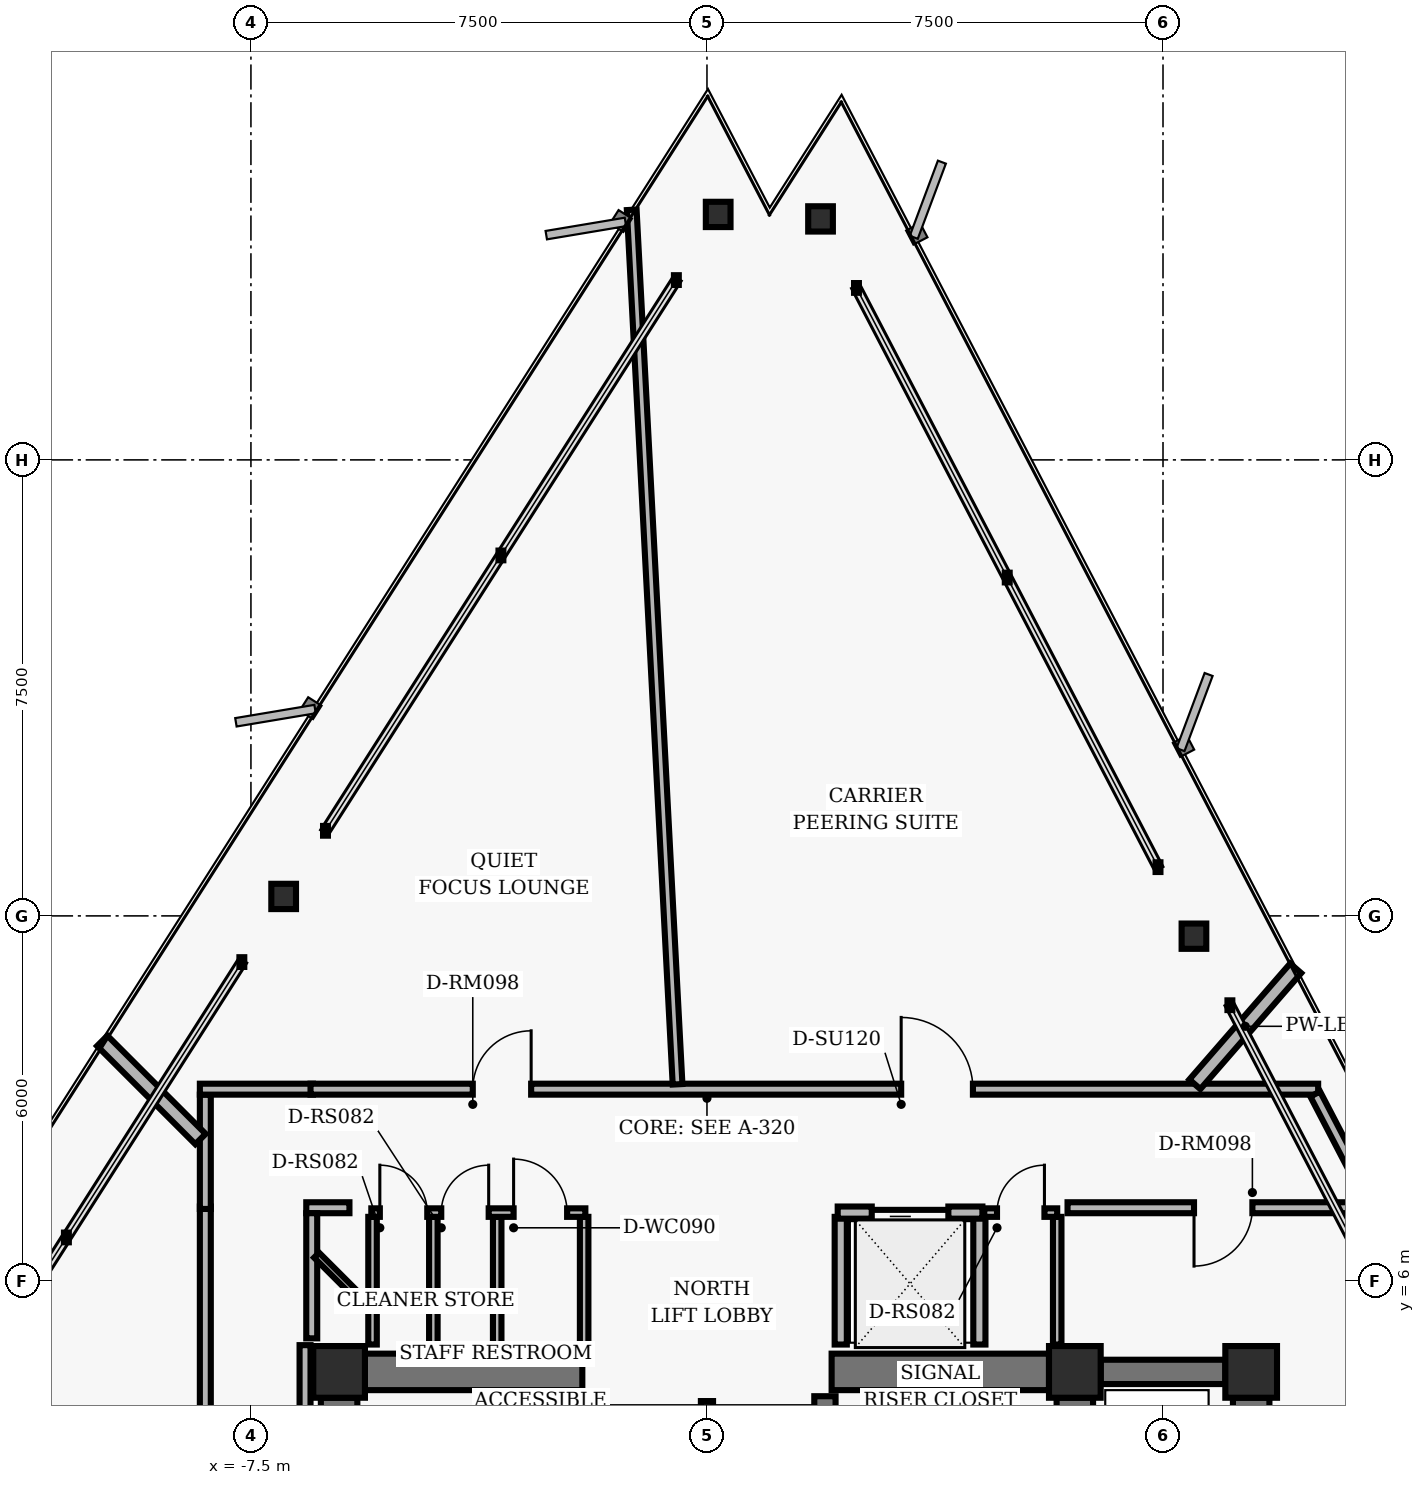
"""IFC4 building model, lengths in metres.
Left out: names, types, materials, properties, quantities, classifications, styles, units other than length and angle.
Written with IfcOpenShell. Run it as: python <this file> out.ifc"""

import sys

from ifc_helpers import new_model, si_unit, direction, frame, frame_2d, origin, origin_2d, place, context, subcontext, project, spatial, rectangle, hollow_rectangle, i_section, extrude, element, fill, save


model = new_model("IFC4")
c1 = context("Model", 3, precision=1e-05, world=origin(), true_north=direction((0.0, 1.0)))
c2 = subcontext(c1, "Body", "Model", "MODEL_VIEW")
j1 = project(units=[si_unit("LENGTHUNIT", "METRE"), si_unit("PLANEANGLEUNIT", "RADIAN")], contexts=[c1])
p1 = place(None, origin())
s1 = spatial("IfcSite", under=j1, at=p1, CompositionType="ELEMENT")
p2 = place(p1, origin())
s2 = spatial("IfcBuilding", under=s1, at=p2, CompositionType="ELEMENT")
p3 = place(p2, frame((0.0, 0.0, 125.92)))
s3 = spatial("IfcBuildingStorey", under=s2, at=p3, CompositionType="ELEMENT", Elevation=125.92)
for number, where, z_axis, x_axis in (
    (1, (-6.05, 4.5, 0.0), (0.0, 0.0, 1.0), (1.0, 0.0, 0.0)),
    (2, (6.05, 4.5, 0.0), (0.0, 0.0, 1.0), (1.0, 0.0, 0.0)),
    (3, (8.95, 4.5, 0.0), (0.0, 0.0, 1.0), (1.0, 0.0, 0.0)),
):
    element("IfcColumn", number, at=place(p3, frame(where, z_axis=z_axis, x_axis=x_axis)), inside=s3, PredefinedType="COLUMN", context=c2, shape_type="SweptSolid", body=[
        extrude(hollow_rectangle(XDim=0.85, YDim=0.85, WallThickness=0.055, InnerFilletRadius=0.02, OuterFilletRadius=0.04, at=origin_2d()), origin(), (0.0, 0.0, 1.0), 3.04),
    ])
for number, where, z_axis, x_axis in (
    (4, (-6.05, 0.425, 0.0), (0.0, 0.0, 1.0), (0.0, 1.0, 0.0)),
    (5, (6.05, 0.425, 0.0), (0.0, 0.0, 1.0), (0.0, 1.0, 0.0)),
):
    element("IfcWall", number, at=place(p3, frame(where, z_axis=z_axis, x_axis=x_axis)), inside=s3, PredefinedType="SHEAR", context=c2, shape_type="SweptSolid", body=[
        extrude(rectangle(XDim=3.65, YDim=0.6, at=frame_2d((1.825, 0.0))), origin(), (0.0, 0.0, 1.0), 2.788),
    ])
for number, where, z_axis, x_axis in (
    (6, (-1.94, -4.1, 0.0), (0.0, 0.0, 1.0), (0.0, 1.0, 0.0)),
    (7, (1.94, -4.1, 0.0), (0.0, 0.0, 1.0), (0.0, 1.0, 0.0)),
):
    element("IfcWall", number, at=place(p3, frame(where, z_axis=z_axis, x_axis=x_axis)), inside=s3, PredefinedType="SHEAR", context=c2, shape_type="SweptSolid", body=[
        extrude(rectangle(XDim=8.2, YDim=0.35, at=frame_2d((4.1, 0.0))), origin(), (0.0, 0.0, 1.0), 2.788),
    ])
for number, where, z_axis, x_axis in (
    (8, (-5.625, 4.5, 0.0), (0.0, 0.0, 1.0), (1.0, 0.0, 0.0)),
    (9, (2.05, 4.5, 0.0), (0.0, 0.0, 1.0), (1.0, 0.0, 0.0)),
):
    element("IfcWall", number, at=place(p3, frame(where, z_axis=z_axis, x_axis=x_axis)), inside=s3, PredefinedType="SHEAR", context=c2, shape_type="SweptSolid", body=[
        extrude(rectangle(XDim=3.575, YDim=0.6, at=frame_2d((1.788, 0.0))), origin(), (0.0, 0.0, 1.0), 2.788),
    ])
p4 = place(p3, frame((8.95, -3.875, 0.0), z_axis=(0.0, 0.0, 1.0), x_axis=(0.0, 1.0, 0.0)))
e10 = element("IfcWall", 10, at=p4, inside=s3, PredefinedType="SHEAR", context=c2, shape_type="SweptSolid", body=[
    extrude(rectangle(XDim=7.95, YDim=0.6, at=frame_2d((3.975, 0.0))), origin(), (0.0, 0.0, 1.0), 2.788),
])
p5 = place(p4, frame((0.55, 0.0, 0.0)))
e11 = element("IfcOpeningElement", 11, at=p5, cuts=e10, PredefinedType="OPENING", context=c2, shape_type="SweptSolid", body=[
    extrude(rectangle(XDim=1.06, YDim=2.04, at=frame_2d((0.53, 1.02))), frame((0.0, 0.31, 0.0), z_axis=(0.0, -1.0, 0.0), x_axis=(1.0, 0.0, 0.0)), (0.0, 0.0, 1.0), 0.62),
])
p6 = place(p4, frame((3.445, 0.0, 0.0)))
e12 = element("IfcOpeningElement", 12, at=p6, cuts=e10, PredefinedType="OPENING", context=c2, shape_type="SweptSolid", body=[
    extrude(rectangle(XDim=1.06, YDim=2.04, at=frame_2d((0.53, 1.02))), frame((0.0, 0.31, 0.0), z_axis=(0.0, -1.0, 0.0), x_axis=(1.0, 0.0, 0.0)), (0.0, 0.0, 1.0), 0.62),
])
p7 = place(p4, frame((6.33, 0.0, 0.0)))
e13 = element("IfcOpeningElement", 13, at=p7, cuts=e10, PredefinedType="OPENING", context=c2, shape_type="SweptSolid", body=[
    extrude(rectangle(XDim=1.06, YDim=2.04, at=frame_2d((0.53, 1.02))), frame((0.0, 0.31, 0.0), z_axis=(0.0, -1.0, 0.0), x_axis=(1.0, 0.0, 0.0)), (0.0, 0.0, 1.0), 0.62),
])
p8 = place(p3, frame((6.475, 4.5, 0.0), z_axis=(0.0, 0.0, 1.0), x_axis=(1.0, 0.0, 0.0)))
e14 = element("IfcWall", 14, at=p8, inside=s3, PredefinedType="SHEAR", context=c2, shape_type="SweptSolid", body=[
    extrude(rectangle(XDim=2.05, YDim=0.4, at=frame_2d((1.025, 0.0))), origin(), (0.0, 0.0, 1.0), 2.788),
])
for number, where, z_axis, x_axis in (
    (15, (8.009, 11.666, 0.0), (0.0, 0.0, 1.0), (1.0, 0.0, 0.0)),
    (16, (1.868, 23.463, 0.0), (0.0, 0.0, 1.0), (1.0, 0.0, 0.0)),
    (17, (0.184, 23.537, 0.0), (0.0, 0.0, 1.0), (1.0, 0.0, 0.0)),
    (18, (-6.962, 12.32, 0.0), (0.0, 0.0, 1.0), (1.0, 0.0, 0.0)),
):
    element("IfcColumn", number, at=place(p3, frame(where, z_axis=z_axis, x_axis=x_axis)), inside=s3, PredefinedType="COLUMN", context=c2, shape_type="SweptSolid", body=[
        extrude(i_section(OverallWidth=0.406, OverallDepth=0.416, WebThickness=0.03, FlangeThickness=0.048, FilletRadius=0.02, at=origin_2d()), origin(), (0.0, 0.0, 1.0), 3.04),
    ])
p9 = place(p3, frame((0.0, 1.25, 0.0), z_axis=(0.0, 0.0, 1.0), x_axis=(0.0, 1.0, 0.0)))
e19 = element("IfcWall", 19, at=p9, inside=s3, PredefinedType="PARTITIONING", context=c2, shape_type="SweptSolid", body=[
    extrude(rectangle(XDim=2.77, YDim=0.2, at=frame_2d((1.385, 0.0))), origin(), (0.0, 0.0, 1.0), 2.763),
])
for number, where, z_axis, x_axis in (
    (20, (2.2, 4.95, 0.0), (0.0, 0.0, 1.0), (0.0, 1.0, 0.0)),
    (21, (4.48, 4.95, 0.0), (0.0, 0.0, 1.0), (0.0, 1.0, 0.0)),
):
    element("IfcWall", number, at=place(p3, frame(where, z_axis=z_axis, x_axis=x_axis)), inside=s3, PredefinedType="PARTITIONING", context=c2, shape_type="SweptSolid", body=[
        extrude(rectangle(XDim=2.1, YDim=0.2, at=frame_2d((1.05, 0.0))), origin(), (0.0, 0.0, 1.0), 2.763),
    ])
p10 = place(p3, frame((2.15, 7.12, 0.0), z_axis=(0.0, 0.0, 1.0), x_axis=(1.0, 0.0, 0.0)))
e22 = element("IfcWall", 22, at=p10, inside=s3, PredefinedType="PARTITIONING", context=c2, shape_type="SweptSolid", body=[
    extrude(rectangle(XDim=2.38, YDim=0.2, at=frame_2d((1.19, 0.0))), origin(), (0.0, 0.0, 1.0), 2.763),
])
p11 = place(p10, frame((0.56, 0.0, 0.0)))
e23 = element("IfcOpeningElement", 23, at=p11, cuts=e22, PredefinedType="OPENING", context=c2, shape_type="SweptSolid", body=[
    extrude(rectangle(XDim=1.26, YDim=2.06, at=frame_2d((0.63, 1.03))), frame((0.0, 0.11, 0.0), z_axis=(0.0, -1.0, 0.0), x_axis=(1.0, 0.0, 0.0)), (0.0, 0.0, 1.0), 0.22),
])
for number, where, z_axis, x_axis in (
    (24, (-5.5, 4.95, 0.0), (0.0, 0.0, 1.0), (0.0, 1.0, 0.0)),
    (25, (-4.5, 4.95, 0.0), (0.0, 0.0, 1.0), (0.0, 1.0, 0.0)),
    (26, (-3.45, 4.95, 0.0), (0.0, 0.0, 1.0), (0.0, 1.0, 0.0)),
    (27, (-2.02, 4.95, 0.0), (0.0, 0.0, 1.0), (0.0, 1.0, 0.0)),
):
    element("IfcWall", number, at=place(p3, frame(where, z_axis=z_axis, x_axis=x_axis)), inside=s3, PredefinedType="PARTITIONING", context=c2, shape_type="SweptSolid", body=[
        extrude(rectangle(XDim=2.1, YDim=0.14, at=frame_2d((1.05, 0.0))), origin(), (0.0, 0.0, 1.0), 2.763),
    ])
p12 = place(p3, frame((-5.52, 7.12, 0.0), z_axis=(0.0, 0.0, 1.0), x_axis=(1.0, 0.0, 0.0)))
e28 = element("IfcWall", 28, at=p12, inside=s3, PredefinedType="PARTITIONING", context=c2, shape_type="SweptSolid", body=[
    extrude(rectangle(XDim=3.52, YDim=0.14, at=frame_2d((1.76, 0.0))), origin(), (0.0, 0.0, 1.0), 2.33),
])
p13 = place(p12, frame((0.14, 0.0, 0.0)))
e29 = element("IfcOpeningElement", 29, at=p13, cuts=e28, PredefinedType="OPENING", context=c2, shape_type="SweptSolid", body=[
    extrude(rectangle(XDim=0.78, YDim=2.01, at=frame_2d((0.39, 1.005))), frame((0.0, 0.08, 0.0), z_axis=(0.0, -1.0, 0.0), x_axis=(1.0, 0.0, 0.0)), (0.0, 0.0, 1.0), 0.16),
])
p14 = place(p12, frame((1.15, 0.0, 0.0)))
e30 = element("IfcOpeningElement", 30, at=p14, cuts=e28, PredefinedType="OPENING", context=c2, shape_type="SweptSolid", body=[
    extrude(rectangle(XDim=0.78, YDim=2.01, at=frame_2d((0.39, 1.005))), frame((0.0, 0.08, 0.0), z_axis=(0.0, -1.0, 0.0), x_axis=(1.0, 0.0, 0.0)), (0.0, 0.0, 1.0), 0.16),
])
p15 = place(p12, frame((2.34, 0.0, 0.0)))
e31 = element("IfcOpeningElement", 31, at=p15, cuts=e28, PredefinedType="OPENING", context=c2, shape_type="SweptSolid", body=[
    extrude(rectangle(XDim=0.88, YDim=2.02, at=frame_2d((0.44, 1.01))), frame((0.0, 0.08, 0.0), z_axis=(0.0, -1.0, 0.0), x_axis=(1.0, 0.0, 0.0)), (0.0, 0.0, 1.0), 0.16),
])
p16 = place(p3, frame((5.76, 4.95, 0.0), z_axis=(0.0, 0.0, 1.0), x_axis=(0.0, 1.0, 0.0)))
e32 = element("IfcWall", 32, at=p16, inside=s3, PredefinedType="PARTITIONING", context=c2, shape_type="SweptSolid", body=[
    extrude(rectangle(XDim=2.1, YDim=0.14, at=frame_2d((1.05, 0.0))), origin(), (0.0, 0.0, 1.0), 2.763),
])
p17 = place(p3, frame((4.56, 7.12, 0.0), z_axis=(0.0, 0.0, 1.0), x_axis=(1.0, 0.0, 0.0)))
e33 = element("IfcWall", 33, at=p17, inside=s3, PredefinedType="PARTITIONING", context=c2, shape_type="SweptSolid", body=[
    extrude(rectangle(XDim=1.2, YDim=0.14, at=frame_2d((0.6, 0.0))), origin(), (0.0, 0.0, 1.0), 2.763),
])
p18 = place(p17, frame((0.21, 0.0, 0.0)))
e34 = element("IfcOpeningElement", 34, at=p18, cuts=e33, PredefinedType="OPENING", context=c2, shape_type="SweptSolid", body=[
    extrude(rectangle(XDim=0.78, YDim=2.01, at=frame_2d((0.39, 1.005))), frame((0.0, 0.08, 0.0), z_axis=(0.0, -1.0, 0.0), x_axis=(1.0, 0.0, 0.0)), (0.0, 0.0, 1.0), 0.16),
])
p19 = place(p3, frame((-8.25, -7.22, 0.0), z_axis=(0.0, 0.0, 1.0), x_axis=(0.0, 1.0, 0.0)))
e35 = element("IfcWall", 35, at=p19, inside=s3, PredefinedType="PARTITIONING", context=c2, shape_type="SweptSolid", body=[
    extrude(rectangle(XDim=14.44, YDim=0.18, at=frame_2d((7.22, 0.0))), origin(), (0.0, 0.0, 1.0), 2.763),
])
p20 = place(p19, frame((2.932, 0.0, 0.0)))
e36 = element("IfcOpeningElement", 36, at=p20, cuts=e35, PredefinedType="OPENING", context=c2, shape_type="SweptSolid", body=[
    extrude(rectangle(XDim=1.18, YDim=2.02, at=frame_2d((0.59, 1.01))), frame((0.0, 0.1, 0.0), z_axis=(0.0, -1.0, 0.0), x_axis=(1.0, 0.0, 0.0)), (0.0, 0.0, 1.0), 0.2),
])
p21 = place(p19, frame((9.892, 0.0, 0.0)))
e37 = element("IfcOpeningElement", 37, at=p21, cuts=e35, PredefinedType="OPENING", context=c2, shape_type="SweptSolid", body=[
    extrude(rectangle(XDim=1.18, YDim=2.02, at=frame_2d((0.59, 1.01))), frame((0.0, 0.1, 0.0), z_axis=(0.0, -1.0, 0.0), x_axis=(1.0, 0.0, 0.0)), (0.0, 0.0, 1.0), 0.2),
])
p22 = place(p3, frame((-8.25, 7.18, 0.0), z_axis=(0.0, 0.0, 1.0), x_axis=(0.0, 1.0, 0.0)))
e38 = element("IfcWall", 38, at=p22, inside=s3, PredefinedType="PARTITIONING", context=c2, shape_type="SweptSolid", body=[
    extrude(rectangle(XDim=1.88, YDim=0.18, at=frame_2d((0.94, 0.0))), origin(), (0.0, 0.0, 1.0), 2.763),
])
p23 = place(p3, frame((-8.34, 9.15, 0.0), z_axis=(0.0, 0.0, 1.0), x_axis=(1.0, 0.0, 0.0)))
e39 = element("IfcWall", 39, at=p23, inside=s3, PredefinedType="PARTITIONING", context=c2, shape_type="SweptSolid", body=[
    extrude(rectangle(XDim=1.86, YDim=0.18, at=frame_2d((0.93, 0.0))), origin(), (0.0, 0.0, 1.0), 2.763),
])
p24 = place(p3, frame((-6.52, 9.15, 0.0), z_axis=(0.0, 0.0, 1.0), x_axis=(1.0, 0.0, 0.0)))
e40 = element("IfcWall", 40, at=p24, inside=s3, PredefinedType="PARTITIONING", context=c2, shape_type="SweptSolid", body=[
    extrude(rectangle(XDim=16.572, YDim=0.18, at=frame_2d((8.286, 0.0))), origin(), (0.0, 0.0, 1.0), 2.33),
])
p25 = place(p24, frame((9.714, 0.0, 0.0)))
e41 = element("IfcOpeningElement", 41, at=p25, cuts=e40, PredefinedType="OPENING", context=c2, shape_type="SweptSolid", body=[
    extrude(rectangle(XDim=1.18, YDim=2.02, at=frame_2d((0.59, 1.01))), frame((0.0, 0.1, 0.0), z_axis=(0.0, -1.0, 0.0), x_axis=(1.0, 0.0, 0.0)), (0.0, 0.0, 1.0), 0.2),
])
p26 = place(p24, frame((2.668, 0.0, 0.0)))
e42 = element("IfcOpeningElement", 42, at=p26, cuts=e40, PredefinedType="OPENING", context=c2, shape_type="SweptSolid", body=[
    extrude(rectangle(XDim=0.96, YDim=2.02, at=frame_2d((0.48, 1.01))), frame((0.0, 0.1, 0.0), z_axis=(0.0, -1.0, 0.0), x_axis=(1.0, 0.0, 0.0)), (0.0, 0.0, 1.0), 0.2),
])
p27 = place(p3, frame((10.003, 9.07, 0.0), z_axis=(0.0, 0.0, 1.0), x_axis=(0.461740291408, -0.887015165198, 0.0)))
e43 = element("IfcWall", 43, at=p27, inside=s3, PredefinedType="PARTITIONING", context=c2, shape_type="SweptSolid", body=[
    extrude(rectangle(XDim=9.976, YDim=0.18, at=frame_2d((4.988, 0.0))), origin(), (0.0, 0.0, 1.0), 2.763),
])
p28 = place(p3, frame((11.05, 7.2, 0.0), z_axis=(0.0, 0.0, 1.0), x_axis=(-1.0, 0.0, 0.0)))
e44 = element("IfcWall", 44, at=p28, inside=s3, PredefinedType="PARTITIONING", context=c2, shape_type="SweptSolid", body=[
    extrude(rectangle(XDim=5.12, YDim=0.18, at=frame_2d((2.56, 0.0))), origin(), (0.0, 0.0, 1.0), 2.763),
])
p29 = place(p28, frame((2.08, 0.0, 0.0)))
e45 = element("IfcOpeningElement", 45, at=p29, cuts=e44, PredefinedType="OPENING", context=c2, shape_type="SweptSolid", body=[
    extrude(rectangle(XDim=0.96, YDim=2.02, at=frame_2d((0.48, 1.01))), frame((0.0, 0.1, 0.0), z_axis=(0.0, -1.0, 0.0), x_axis=(1.0, 0.0, 0.0)), (0.0, 0.0, 1.0), 0.2),
])
p30 = place(p3, frame((-5.88, 7.2, 0.0), z_axis=(0.0, 0.0, 1.0), x_axis=(-1.0, 0.0, 0.0)))
e46 = element("IfcWall", 46, at=p30, inside=s3, PredefinedType="PARTITIONING", context=c2, shape_type="SweptSolid", body=[
    extrude(rectangle(XDim=0.71, YDim=0.18, at=frame_2d((0.355, 0.0))), origin(), (0.0, 0.0, 1.0), 2.33),
])
p31 = place(p3, frame((-6.5, 7.11, 0.0), z_axis=(0.0, 0.0, 1.0), x_axis=(0.0, -1.0, 0.0)))
e47 = element("IfcWall", 47, at=p31, inside=s3, PredefinedType="PARTITIONING", context=c2, shape_type="SweptSolid", body=[
    extrude(rectangle(XDim=2.058, YDim=0.18, at=frame_2d((1.029, 0.0))), origin(), (0.0, 0.0, 1.0), 2.132),
])
p32 = place(p3, frame((-6.61, 4.94, 0.0), z_axis=(0.0, 0.0, 1.0), x_axis=(0.0, -1.0, 0.0)))
e48 = element("IfcWall", 48, at=p32, inside=s3, PredefinedType="PARTITIONING", context=c2, shape_type="SweptSolid", body=[
    extrude(rectangle(XDim=9.46, YDim=0.18, at=frame_2d((4.73, 0.0))), origin(), (0.0, 0.0, 1.0), 2.763),
])
p33 = place(p3, frame((8.023, 9.23, 0.0), z_axis=(0.0, 0.0, 1.0), x_axis=(0.656032852837, 0.754732334009, 0.0)))
e49 = element("IfcWall", 49, at=p33, inside=s3, PredefinedType="PARTITIONING", context=c2, shape_type="SweptSolid", body=[
    extrude(rectangle(XDim=2.528, YDim=0.24, at=frame_2d((1.264, 0.0))), origin(), (0.0, 0.0, 1.0), 2.763),
])
p34 = place(p3, frame((-0.484, 9.23, 0.0), z_axis=(0.0, 0.0, 1.0), x_axis=(-0.052344416919, 0.998629091313, 0.0)))
e50 = element("IfcWall", 50, at=p34, inside=s3, PredefinedType="PARTITIONING", context=c2, shape_type="SweptSolid", body=[
    extrude(rectangle(XDim=14.403, YDim=0.16, at=frame_2d((7.201, 0.0))), origin(), (0.0, 0.0, 1.0), 2.763),
])
p35 = place(p3, frame((-5.8, 5.8, 0.0), z_axis=(0.0, 0.0, 1.0), x_axis=(-0.707106781187, 0.707106781187, 0.0)))
e51 = element("IfcWall", 51, at=p35, inside=s3, PredefinedType="MOVABLE", context=c2, shape_type="SweptSolid", body=[
    extrude(rectangle(XDim=0.877, YDim=0.115, at=frame_2d((0.438, 0.0))), origin(), (0.0, 0.0, 1.0), 2.763),
])
p36 = place(p3, frame((-8.33, 8.33, 0.0), z_axis=(0.0, 0.0, 1.0), x_axis=(-0.707106781187, 0.707106781187, 0.0)))
e52 = element("IfcWall", 52, at=p36, inside=s3, PredefinedType="PARTITIONING", context=c2, shape_type="SweptSolid", body=[
    extrude(rectangle(XDim=2.284, YDim=0.24, at=frame_2d((1.142, 0.0))), origin(), (0.0, 0.0, 1.0), 2.763),
])
p37 = place(p11, origin())
e53 = element("IfcDoor", 53, at=p37, inside=s3, OperationType="SLIDING_TO_LEFT", PredefinedType="DOOR", context=c2, shape_type="SweptSolid", body=[
    extrude(rectangle(XDim=1.26, YDim=2.06, at=frame_2d((0.63, 1.03))), frame((0.0, 0.025, 0.0), z_axis=(0.0, -1.0, 0.0), x_axis=(1.0, 0.0, 0.0)), (0.0, 0.0, 1.0), 0.05),
])
fill(e23, e53)
p38 = place(p13, origin())
e54 = element("IfcDoor", 54, at=p38, inside=s3, OperationType="SINGLE_SWING_LEFT", PredefinedType="DOOR", context=c2, shape_type="SweptSolid", body=[
    extrude(rectangle(XDim=0.78, YDim=2.01, at=frame_2d((0.39, 1.005))), frame((0.0, 0.025, 0.0), z_axis=(0.0, -1.0, 0.0), x_axis=(1.0, 0.0, 0.0)), (0.0, 0.0, 1.0), 0.05),
])
fill(e29, e54)
p39 = place(p14, origin())
e55 = element("IfcDoor", 55, at=p39, inside=s3, OperationType="SINGLE_SWING_RIGHT", PredefinedType="DOOR", context=c2, shape_type="SweptSolid", body=[
    extrude(rectangle(XDim=0.78, YDim=2.01, at=frame_2d((0.39, 1.005))), frame((0.0, 0.025, 0.0), z_axis=(0.0, -1.0, 0.0), x_axis=(1.0, 0.0, 0.0)), (0.0, 0.0, 1.0), 0.05),
])
fill(e30, e55)
p40 = place(p15, origin())
e56 = element("IfcDoor", 56, at=p40, inside=s3, OperationType="SINGLE_SWING_LEFT", PredefinedType="DOOR", context=c2, shape_type="SweptSolid", body=[
    extrude(rectangle(XDim=0.88, YDim=2.02, at=frame_2d((0.44, 1.01))), frame((0.0, 0.025, 0.0), z_axis=(0.0, -1.0, 0.0), x_axis=(1.0, 0.0, 0.0)), (0.0, 0.0, 1.0), 0.05),
])
fill(e31, e56)
p41 = place(p18, origin())
e57 = element("IfcDoor", 57, at=p41, inside=s3, OperationType="SINGLE_SWING_RIGHT", PredefinedType="DOOR", context=c2, shape_type="SweptSolid", body=[
    extrude(rectangle(XDim=0.78, YDim=2.01, at=frame_2d((0.39, 1.005))), frame((0.0, 0.025, 0.0), z_axis=(0.0, -1.0, 0.0), x_axis=(1.0, 0.0, 0.0)), (0.0, 0.0, 1.0), 0.05),
])
fill(e34, e57)
p42 = place(p29, origin())
e58 = element("IfcDoor", 58, at=p42, inside=s3, OperationType="SINGLE_SWING_RIGHT", PredefinedType="DOOR", context=c2, shape_type="SweptSolid", body=[
    extrude(rectangle(XDim=0.96, YDim=2.02, at=frame_2d((0.48, 1.01))), frame((0.0, 0.025, 0.0), z_axis=(0.0, -1.0, 0.0), x_axis=(1.0, 0.0, 0.0)), (0.0, 0.0, 1.0), 0.05),
])
fill(e45, e58)
p43 = place(p25, origin())
e59 = element("IfcDoor", 59, at=p43, inside=s3, OperationType="SINGLE_SWING_LEFT", PredefinedType="DOOR", context=c2, shape_type="SweptSolid", body=[
    extrude(rectangle(XDim=1.18, YDim=2.02, at=frame_2d((0.59, 1.01))), frame((0.0, 0.025, 0.0), z_axis=(0.0, -1.0, 0.0), x_axis=(1.0, 0.0, 0.0)), (0.0, 0.0, 1.0), 0.05),
])
fill(e41, e59)
p44 = place(p26, origin())
e60 = element("IfcDoor", 60, at=p44, inside=s3, OperationType="SINGLE_SWING_RIGHT", PredefinedType="DOOR", context=c2, shape_type="SweptSolid", body=[
    extrude(rectangle(XDim=0.96, YDim=2.02, at=frame_2d((0.48, 1.01))), frame((0.0, 0.025, 0.0), z_axis=(0.0, -1.0, 0.0), x_axis=(1.0, 0.0, 0.0)), (0.0, 0.0, 1.0), 0.05),
])
fill(e42, e60)
save(model, sys.argv[1])
